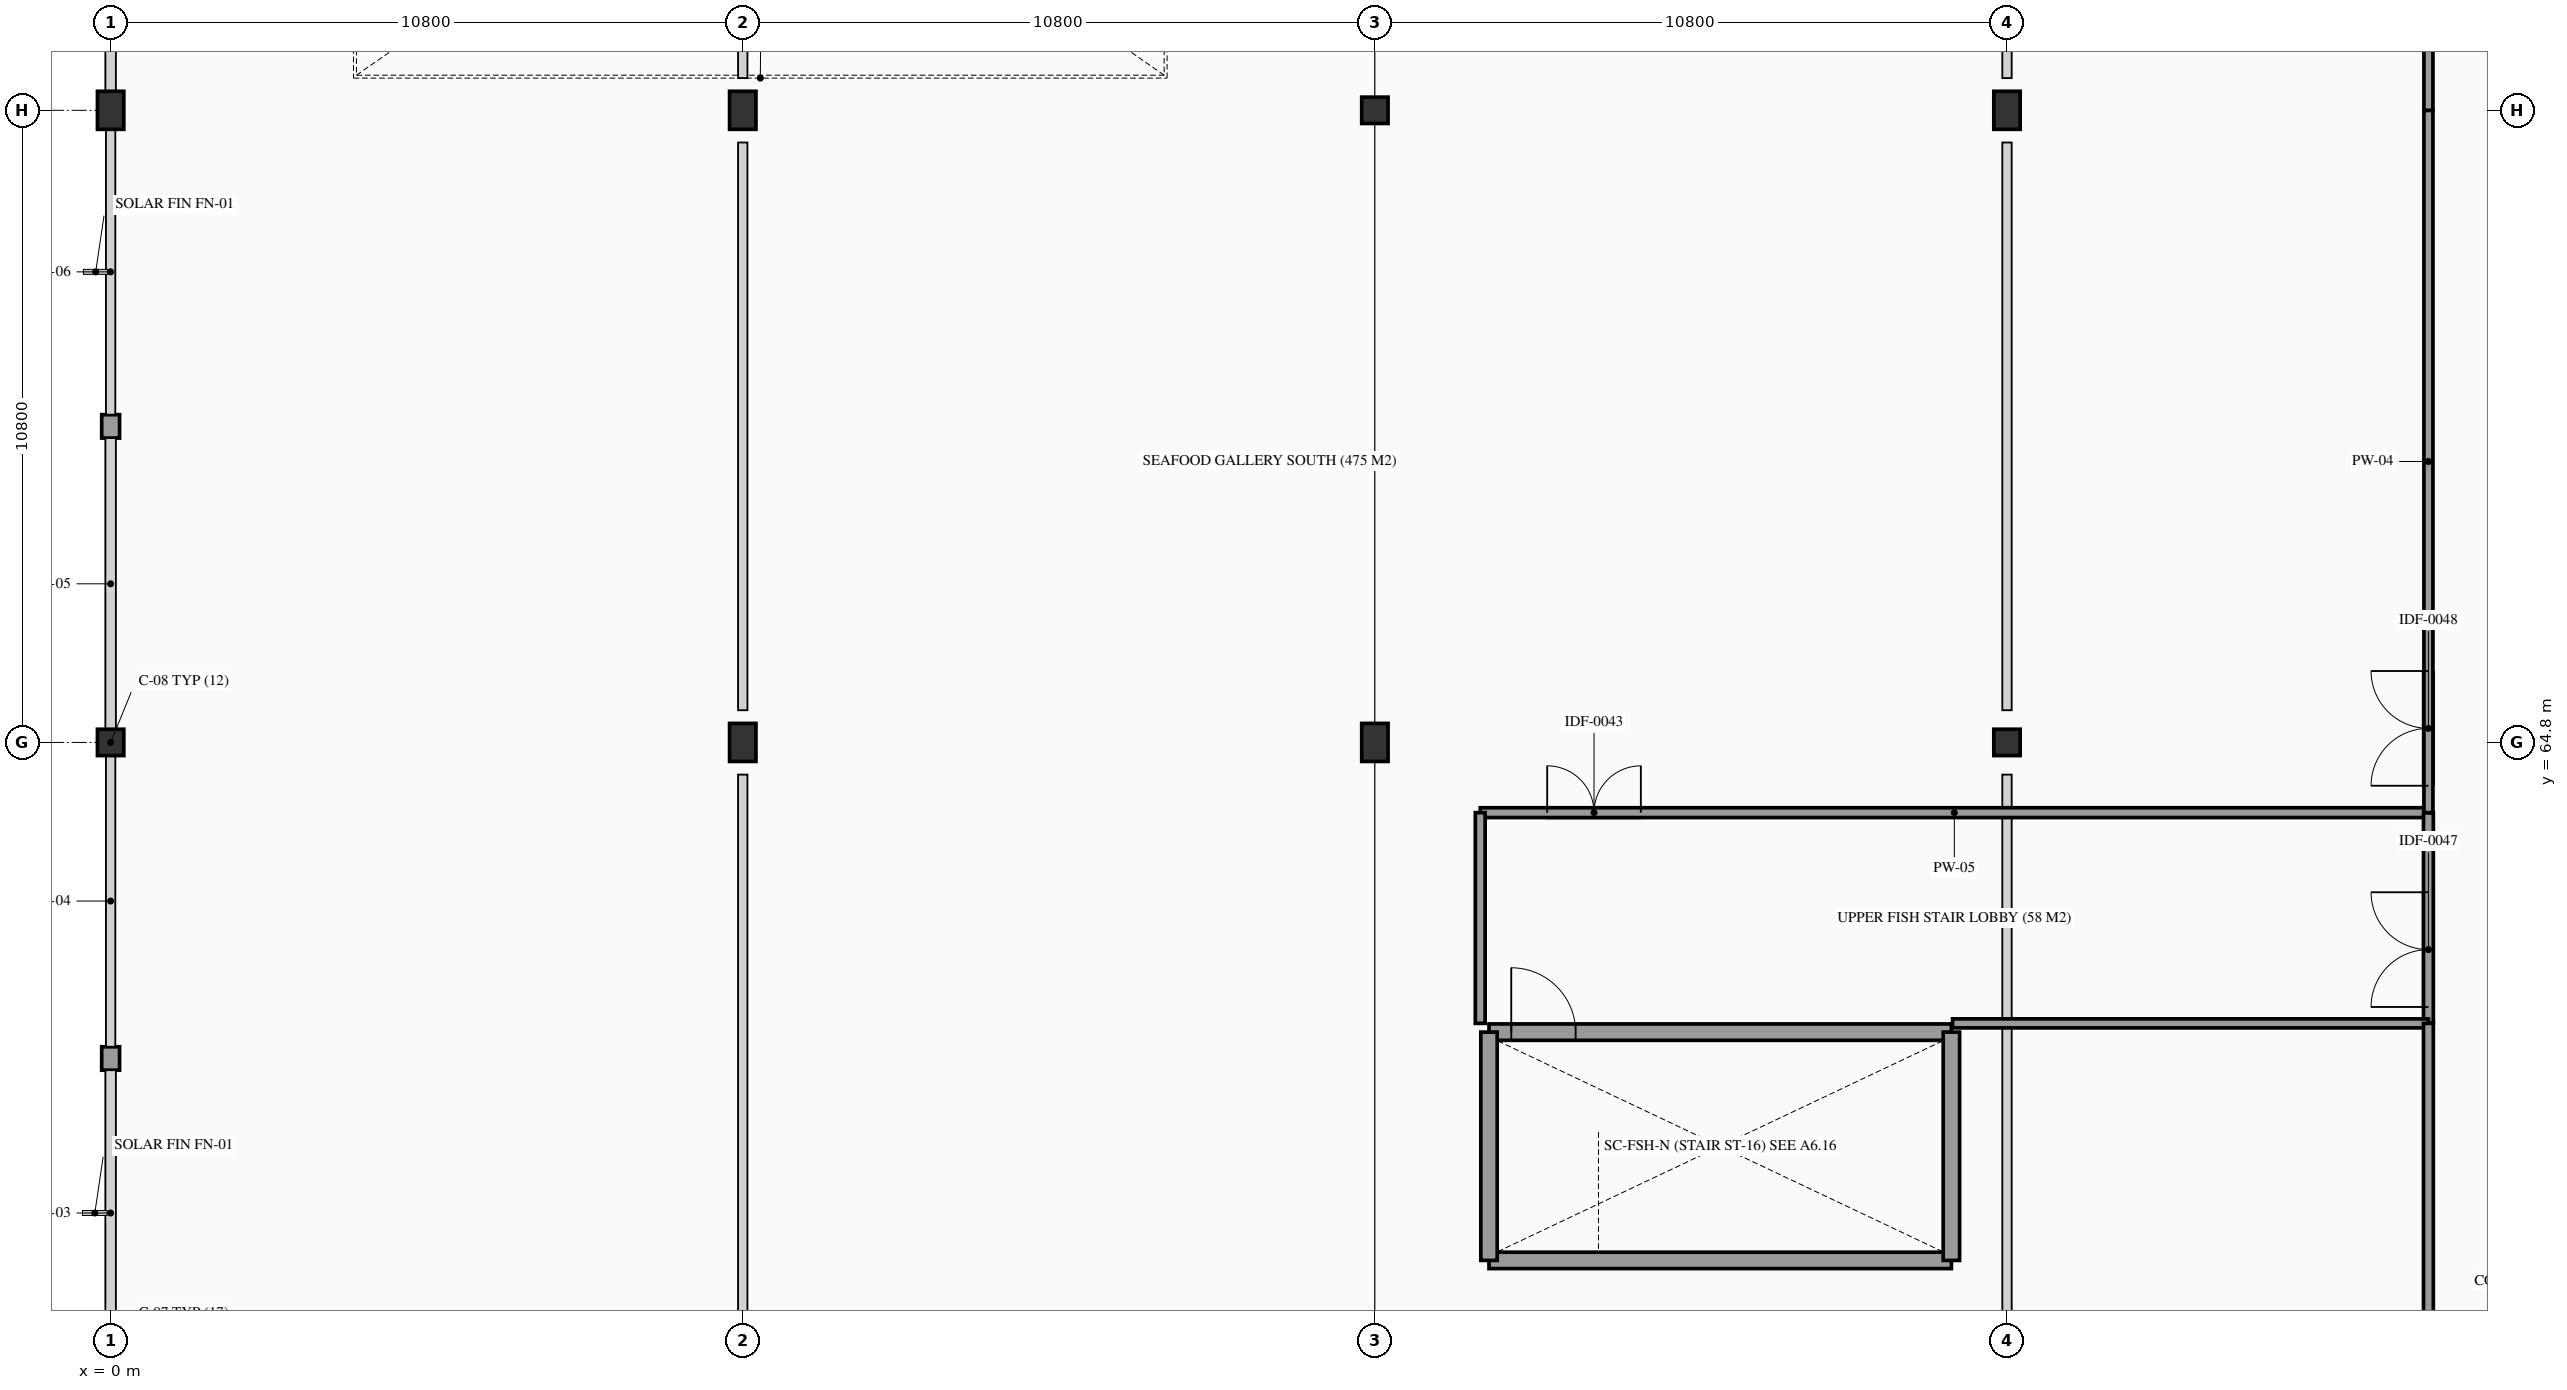
"""IFC4 building model, lengths in metres.
Left out: names, types, materials, properties, quantities, classifications, styles, units other than length and angle.
Written with IfcOpenShell. Run it as: python <this file> out.ifc"""

import sys

from ifc_helpers import new_model, si_unit, direction, frame, frame_2d, origin, origin_2d, place, context, subcontext, project, spatial, rectangle, extrude, element, fill, save


model = new_model("IFC4")
c1 = context("Model", 3, precision=1e-05, world=origin(), true_north=direction((0.0, 1.0)))
c2 = subcontext(c1, "Body", "Model", "MODEL_VIEW")
j1 = project(units=[si_unit("LENGTHUNIT", "METRE"), si_unit("PLANEANGLEUNIT", "RADIAN")], contexts=[c1])
p1 = place(None, origin())
s1 = spatial("IfcSite", under=j1, at=p1, CompositionType="ELEMENT")
p2 = place(p1, origin())
s2 = spatial("IfcBuilding", under=s1, at=p2, CompositionType="ELEMENT")
p3 = place(p2, frame((0.0, 0.0, 5.4)))
s3 = spatial("IfcBuildingStorey", under=s2, at=p3, CompositionType="ELEMENT", Elevation=5.4)
p4 = place(p3, frame((0.0, 64.8, 0.0), z_axis=(0.0, 0.0, 1.0), x_axis=(1.0, 0.0, 0.0)))
e1 = element("IfcColumn", 1, at=p4, inside=s3, PredefinedType="COLUMN", context=c2, shape_type="SweptSolid", body=[
    extrude(rectangle(XDim=0.45, YDim=0.45, at=origin_2d()), origin(), (0.0, 0.0, 1.0), 4.68),
])
for number, where, z_axis, x_axis in (
    (2, (0.0, 75.6, 0.0), (0.0, 0.0, 1.0), (1.0, 0.0, 0.0)),
    (3, (10.8, 64.8, 0.0), (0.0, 0.0, 1.0), (1.0, 0.0, 0.0)),
    (4, (10.8, 75.6, 0.0), (0.0, 0.0, 1.0), (1.0, 0.0, 0.0)),
    (5, (21.6, 64.8, 0.0), (0.0, 0.0, 1.0), (1.0, 0.0, 0.0)),
):
    element("IfcColumn", number, at=place(p3, frame(where, z_axis=z_axis, x_axis=x_axis)), inside=s3, PredefinedType="COLUMN", context=c2, shape_type="SweptSolid", body=[
        extrude(rectangle(XDim=0.45, YDim=0.65, at=origin_2d()), origin(), (0.0, 0.0, 1.0), 4.68),
    ])
for number, where, z_axis, x_axis in (
    (6, (21.6, 75.6, 0.0), (0.0, 0.0, 1.0), (1.0, 0.0, 0.0)),
    (7, (32.4, 64.8, 0.0), (0.0, 0.0, 1.0), (1.0, 0.0, 0.0)),
):
    element("IfcColumn", number, at=place(p3, frame(where, z_axis=z_axis, x_axis=x_axis)), inside=s3, PredefinedType="COLUMN", context=c2, shape_type="SweptSolid", body=[
        extrude(rectangle(XDim=0.45, YDim=0.45, at=origin_2d()), origin(), (0.0, 0.0, 1.0), 4.68),
    ])
p5 = place(p3, frame((32.4, 75.6, 0.0), z_axis=(0.0, 0.0, 1.0), x_axis=(1.0, 0.0, 0.0)))
e8 = element("IfcColumn", 8, at=p5, inside=s3, PredefinedType="COLUMN", context=c2, shape_type="SweptSolid", body=[
    extrude(rectangle(XDim=0.45, YDim=0.65, at=origin_2d()), origin(), (0.0, 0.0, 1.0), 4.68),
])
p6 = place(p3, frame((0.0, 59.2, 0.0), z_axis=(0.0, 0.0, 1.0), x_axis=(0.0, 1.0, 0.0)))
e9 = element("IfcWall", 9, at=p6, inside=s3, PredefinedType="STANDARD", context=c2, shape_type="SweptSolid", body=[
    extrude(rectangle(XDim=0.4, YDim=0.305, at=frame_2d((0.2, 0.0))), origin(), (0.0, 0.0, 1.0), 3.53),
])
p7 = place(p3, frame((0.0, 70.0, 0.0), z_axis=(0.0, 0.0, 1.0), x_axis=(0.0, 1.0, 0.0)))
e10 = element("IfcWall", 10, at=p7, inside=s3, PredefinedType="STANDARD", context=c2, shape_type="SweptSolid", body=[
    extrude(rectangle(XDim=0.4, YDim=0.305, at=frame_2d((0.2, 0.0))), origin(), (0.0, 0.0, 1.0), 3.53),
])
p8 = place(p3, frame((23.55, 55.95, 0.0), z_axis=(0.0, 0.0, 1.0), x_axis=(1.0, 0.0, 0.0)))
e11 = element("IfcWall", 11, at=p8, inside=s3, PredefinedType="SHEAR", context=c2, shape_type="SweptSolid", body=[
    extrude(rectangle(XDim=7.9, YDim=0.28, at=frame_2d((3.95, 0.0))), origin(), (0.0, 0.0, 1.0), 4.68),
])
p9 = place(p3, frame((23.55, 59.85, 0.0), z_axis=(0.0, 0.0, 1.0), x_axis=(1.0, 0.0, 0.0)))
e12 = element("IfcWall", 12, at=p9, inside=s3, PredefinedType="SHEAR", context=c2, shape_type="SweptSolid", body=[
    extrude(rectangle(XDim=7.9, YDim=0.28, at=frame_2d((3.95, 0.0))), origin(), (0.0, 0.0, 1.0), 4.68),
])
p10 = place(p9, frame((0.38, 0.0, 0.0)))
e13 = element("IfcOpeningElement", 13, at=p10, cuts=e12, PredefinedType="OPENING", context=c2, shape_type="SweptSolid", body=[
    extrude(rectangle(XDim=1.1, YDim=2.2, at=frame_2d((0.55, 1.1))), frame((0.0, 0.15, 0.0), z_axis=(0.0, -1.0, 0.0), x_axis=(1.0, 0.0, 0.0)), (0.0, 0.0, 1.0), 0.3),
])
for number, where, z_axis, x_axis in (
    (14, (23.55, 55.95, 0.0), (0.0, 0.0, 1.0), (0.0, 1.0, 0.0)),
    (15, (31.45, 55.95, 0.0), (0.0, 0.0, 1.0), (0.0, 1.0, 0.0)),
):
    element("IfcWall", number, at=place(p3, frame(where, z_axis=z_axis, x_axis=x_axis)), inside=s3, PredefinedType="SHEAR", context=c2, shape_type="SweptSolid", body=[
        extrude(rectangle(XDim=3.9, YDim=0.28, at=frame_2d((1.95, 0.0))), origin(), (0.0, 0.0, 1.0), 4.68),
    ])
p11 = place(p3, frame((23.4, 63.6, 0.0), z_axis=(0.0, 0.0, 1.0), x_axis=(1.0, 0.0, 0.0)))
e16 = element("IfcWall", 16, at=p11, inside=s3, PredefinedType="PARTITIONING", context=c2, shape_type="SweptSolid", body=[
    extrude(rectangle(XDim=16.2, YDim=0.168, at=frame_2d((8.1, 0.0))), origin(), (0.0, 0.0, 1.0), 3.23),
])
p12 = place(p11, frame((1.144, 0.0, 0.0)))
e17 = element("IfcOpeningElement", 17, at=p12, cuts=e16, PredefinedType="OPENING", context=c2, shape_type="SweptSolid", body=[
    extrude(rectangle(XDim=1.6, YDim=2.2, at=frame_2d((0.8, 1.1))), frame((0.0, 0.094, 0.0), z_axis=(0.0, -1.0, 0.0), x_axis=(1.0, 0.0, 0.0)), (0.0, 0.0, 1.0), 0.188),
])
p13 = place(p3, frame((39.6, 60.0, 0.0), z_axis=(0.0, 0.0, 1.0), x_axis=(0.0, 1.0, 0.0)))
e18 = element("IfcWall", 18, at=p13, inside=s3, PredefinedType="PARTITIONING", context=c2, shape_type="SweptSolid", body=[
    extrude(rectangle(XDim=3.6, YDim=0.168, at=frame_2d((1.8, 0.0))), origin(), (0.0, 0.0, 1.0), 3.23),
])
p14 = place(p13, frame((0.28, 0.0, 0.0)))
e19 = element("IfcOpeningElement", 19, at=p14, cuts=e18, PredefinedType="OPENING", context=c2, shape_type="SweptSolid", body=[
    extrude(rectangle(XDim=1.96, YDim=2.3, at=frame_2d((0.98, 1.15))), frame((0.0, 0.094, 0.0), z_axis=(0.0, -1.0, 0.0), x_axis=(1.0, 0.0, 0.0)), (0.0, 0.0, 1.0), 0.188),
])
p15 = place(p3, frame((39.6, 63.6, 0.0), z_axis=(0.0, 0.0, 1.0), x_axis=(0.0, 1.0, 0.0)))
e20 = element("IfcWall", 20, at=p15, inside=s3, PredefinedType="PARTITIONING", context=c2, shape_type="SweptSolid", body=[
    extrude(rectangle(XDim=12.0, YDim=0.154, at=frame_2d((6.0, 0.0))), origin(), (0.0, 0.0, 1.0), 3.23),
])
p16 = place(p15, frame((0.46, 0.0, 0.0)))
e21 = element("IfcOpeningElement", 21, at=p16, cuts=e20, PredefinedType="OPENING", context=c2, shape_type="SweptSolid", body=[
    extrude(rectangle(XDim=1.96, YDim=2.3, at=frame_2d((0.98, 1.15))), frame((0.0, 0.087, 0.0), z_axis=(0.0, -1.0, 0.0), x_axis=(1.0, 0.0, 0.0)), (0.0, 0.0, 1.0), 0.174),
])
p17 = place(p3, frame((31.47, 60.0, 0.0), z_axis=(0.0, 0.0, 1.0), x_axis=(1.0, 0.0, 0.0)))
e22 = element("IfcWall", 22, at=p17, inside=s3, PredefinedType="PARTITIONING", context=c2, shape_type="SweptSolid", body=[
    extrude(rectangle(XDim=8.13, YDim=0.154, at=frame_2d((4.065, 0.0))), origin(), (0.0, 0.0, 1.0), 3.23),
])
p18 = place(p3, frame((23.4, 60.0, 0.0), z_axis=(0.0, 0.0, 1.0), x_axis=(0.0, 1.0, 0.0)))
e23 = element("IfcWall", 23, at=p18, inside=s3, PredefinedType="PARTITIONING", context=c2, shape_type="SweptSolid", body=[
    extrude(rectangle(XDim=3.6, YDim=0.168, at=frame_2d((1.8, 0.0))), origin(), (0.0, 0.0, 1.0), 3.23),
])
p19 = place(p3, frame((39.6, 54.0, 0.0), z_axis=(0.0, 0.0, 1.0), x_axis=(0.0, 1.0, 0.0)))
e24 = element("IfcWall", 24, at=p19, inside=s3, PredefinedType="PARTITIONING", context=c2, shape_type="SweptSolid", body=[
    extrude(rectangle(XDim=6.0, YDim=0.168, at=frame_2d((3.0, 0.0))), origin(), (0.0, 0.0, 1.0), 3.23),
])
p20 = place(p3, frame((39.6, 75.6, 0.0), z_axis=(0.0, 0.0, 1.0), x_axis=(0.0, 1.0, 0.0)))
e25 = element("IfcWall", 25, at=p20, inside=s3, PredefinedType="PARTITIONING", context=c2, shape_type="SweptSolid", body=[
    extrude(rectangle(XDim=12.0, YDim=0.154, at=frame_2d((6.0, 0.0))), origin(), (0.0, 0.0, 1.0), 3.23),
])
p21 = place(p10, origin())
e26 = element("IfcDoor", 26, at=p21, inside=s3, OperationType="SINGLE_SWING_LEFT", PredefinedType="DOOR", context=c2, shape_type="SweptSolid", body=[
    extrude(rectangle(XDim=1.1, YDim=2.2, at=frame_2d((0.55, 1.1))), frame((0.0, 0.025, 0.0), z_axis=(0.0, -1.0, 0.0), x_axis=(1.0, 0.0, 0.0)), (0.0, 0.0, 1.0), 0.05),
])
fill(e13, e26)
p22 = place(p12, origin())
e27 = element("IfcDoor", 27, at=p22, inside=s3, OperationType="DOUBLE_DOOR_SINGLE_SWING", PredefinedType="DOOR", context=c2, shape_type="SweptSolid", body=[
    extrude(rectangle(XDim=1.6, YDim=2.2, at=frame_2d((0.8, 1.1))), frame((0.0, 0.025, 0.0), z_axis=(0.0, -1.0, 0.0), x_axis=(1.0, 0.0, 0.0)), (0.0, 0.0, 1.0), 0.05),
])
fill(e17, e27)
p23 = place(p14, origin())
e28 = element("IfcDoor", 28, at=p23, inside=s3, OperationType="DOUBLE_DOOR_SINGLE_SWING", PredefinedType="DOOR", context=c2, shape_type="SweptSolid", body=[
    extrude(rectangle(XDim=1.96, YDim=2.3, at=frame_2d((0.98, 1.15))), frame((0.0, 0.025, 0.0), z_axis=(0.0, -1.0, 0.0), x_axis=(1.0, 0.0, 0.0)), (0.0, 0.0, 1.0), 0.05),
])
fill(e19, e28)
p24 = place(p16, frame((1.96, 0.0, 0.0), z_axis=(0.0, 0.0, 1.0), x_axis=(-1.0, 0.0, 0.0)))
e29 = element("IfcDoor", 29, at=p24, inside=s3, OperationType="DOUBLE_DOOR_SINGLE_SWING", PredefinedType="DOOR", context=c2, shape_type="SweptSolid", body=[
    extrude(rectangle(XDim=1.96, YDim=2.3, at=frame_2d((0.98, 1.15))), frame((0.0, 0.025, 0.0), z_axis=(0.0, -1.0, 0.0), x_axis=(1.0, 0.0, 0.0)), (0.0, 0.0, 1.0), 0.05),
])
fill(e21, e29)
save(model, sys.argv[1])
